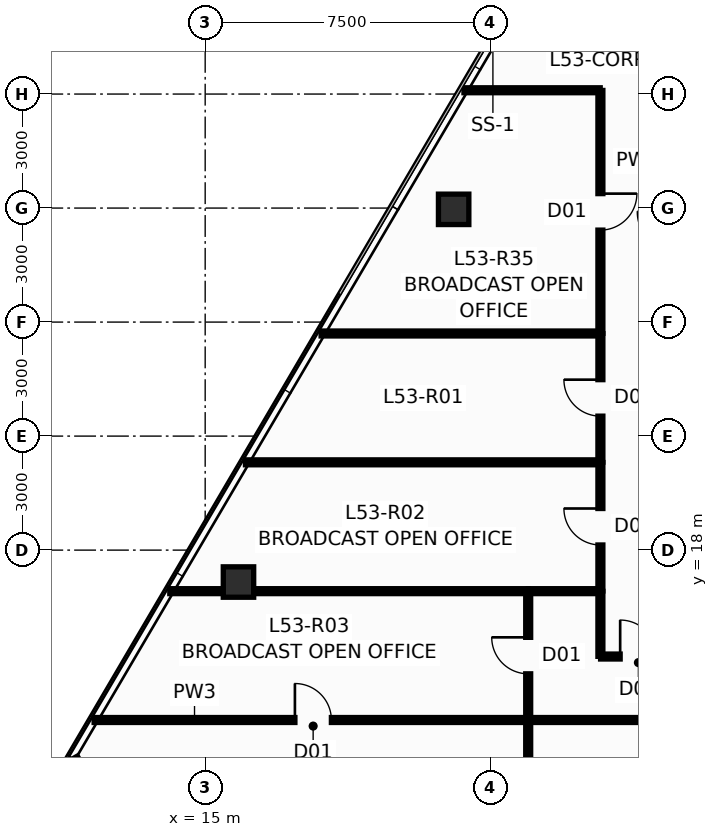
"""IFC4 building model, lengths in metres.
Left out: names, types, materials, properties, quantities, classifications, styles, units other than length and angle.
Written with IfcOpenShell. Run it as: python <this file> out.ifc"""

import sys

from ifc_helpers import new_model, si_unit, direction, frame, frame_2d, origin, origin_2d, place, context, subcontext, project, spatial, rectangle, hollow_rectangle, extrude, source, transform, mapped, element, fill, save


model = new_model("IFC4")
c1 = context("Model", 3, precision=1e-05, world=origin(), true_north=direction((0.0, 1.0)))
c2 = subcontext(c1, "Body", "Model", "MODEL_VIEW")
j1 = project(units=[si_unit("LENGTHUNIT", "METRE"), si_unit("PLANEANGLEUNIT", "RADIAN")], contexts=[c1])
p1 = place(None, origin())
s1 = spatial("IfcSite", under=j1, at=p1, CompositionType="ELEMENT")
p2 = place(p1, origin())
s2 = spatial("IfcBuilding", under=s1, at=p2, CompositionType="ELEMENT")
p3 = place(p2, frame((0.0, 0.0, 202.3)))
s3 = spatial("IfcBuildingStorey", under=s2, at=p3, CompositionType="ELEMENT", Elevation=202.3)
m1 = source(origin(), c2, "Body", "SweptSolid", [
    extrude(hollow_rectangle(XDim=0.8, YDim=0.8, WallThickness=0.045, at=origin_2d()), origin(), (0.0, 0.0, 1.0), 3.651),
])
p4 = place(p3, frame((21.538, 26.967, 0.0), z_axis=(0.014913313399, -0.013776424037, 0.999793880369), x_axis=(0.678553674548, 0.734550822447, 0.0)))
e1 = element("IfcColumn", 1, at=p4, inside=s3, PredefinedType="COLUMN", context=c2, shape_type="MappedRepresentation", body=[
    mapped(m1, transform((0.0, 0.0, 0.0), scale=1.0)),
])
m2 = source(origin(), c2, "Body", "SweptSolid", [
    extrude(hollow_rectangle(XDim=0.8, YDim=0.8, WallThickness=0.045, at=origin_2d()), origin(), (0.0, 0.0, 1.0), 3.651),
])
p5 = place(p3, frame((15.876, 17.16, 0.0), z_axis=(0.010431795422, -0.021532295679, 0.999713727968), x_axis=(0.899947055326, 0.435999194506, 0.0)))
e2 = element("IfcColumn", 2, at=p5, inside=s3, PredefinedType="COLUMN", context=c2, shape_type="MappedRepresentation", body=[
    mapped(m2, transform((0.0, 0.0, 0.0), scale=1.0)),
])
p6 = place(p3, frame((14.689, 6.879, 0.0), z_axis=(0.0, 0.0, 1.0), x_axis=(-0.490928119332, 0.871200081295, 0.0)))
e3 = element("IfcWall", 3, at=p6, inside=s3, PredefinedType="STANDARD", context=c2, shape_type="SweptSolid", body=[
    extrude(rectangle(XDim=6.464, YDim=0.28, at=frame_2d((3.232, 0.0))), origin(), (0.0, 0.0, 1.0), 3.4),
])
p7 = place(p6, frame((1.58, 0.0, 0.9)))
e4 = element("IfcOpeningElement", 4, at=p7, cuts=e3, PredefinedType="OPENING", context=c2, shape_type="SweptSolid", body=[
    extrude(rectangle(XDim=1.5, YDim=1.8, at=frame_2d((0.75, 0.9))), frame((0.0, 0.152, 0.0), z_axis=(0.0, -1.0, 0.0), x_axis=(1.0, 0.0, 0.0)), (0.0, 0.0, 1.0), 0.304),
])
p8 = place(p3, frame((12.078, 13.53, 0.0), z_axis=(0.0, 0.0, 1.0), x_axis=(1.0, 0.0, 0.0)))
e5 = element("IfcWall", 5, at=p8, inside=s3, PredefinedType="PARTITIONING", context=c2, shape_type="SweptSolid", body=[
    extrude(rectangle(XDim=11.417, YDim=0.13, at=frame_2d((5.708, 0.0))), origin(), (0.0, 0.0, 1.0), 3.4),
])
p9 = place(p8, frame((5.283, 0.0, 0.0)))
e6 = element("IfcOpeningElement", 6, at=p9, cuts=e5, PredefinedType="OPENING", context=c2, shape_type="SweptSolid", body=[
    extrude(rectangle(XDim=0.96, YDim=2.15, at=frame_2d((0.48, 1.075))), frame((0.0, 0.077, 0.0), z_axis=(0.0, -1.0, 0.0), x_axis=(1.0, 0.0, 0.0)), (0.0, 0.0, 1.0), 0.154),
])
p10 = place(p3, frame((23.505, 13.53, 0.0), z_axis=(0.0, 0.0, 1.0), x_axis=(1.0, 0.0, 0.0)))
e7 = element("IfcWall", 7, at=p10, inside=s3, PredefinedType="PARTITIONING", context=c2, shape_type="SweptSolid", body=[
    extrude(rectangle(XDim=9.69, YDim=0.13, at=frame_2d((4.845, 0.0))), origin(), (0.0, 0.0, 1.0), 3.078),
])
p11 = place(p10, frame((4.365, 0.0, 0.0)))
e8 = element("IfcOpeningElement", 8, at=p11, cuts=e7, PredefinedType="OPENING", context=c2, shape_type="SweptSolid", body=[
    extrude(rectangle(XDim=0.96, YDim=2.15, at=frame_2d((0.48, 1.075))), frame((0.0, 0.077, 0.0), z_axis=(0.0, -1.0, 0.0), x_axis=(1.0, 0.0, 0.0)), (0.0, 0.0, 1.0), 0.154),
])
p12 = place(p3, frame((14.069, 16.92, 0.0), z_axis=(0.0, 0.0, 1.0), x_axis=(1.0, 0.0, 0.0)))
e9 = element("IfcWall", 9, at=p12, inside=s3, PredefinedType="PARTITIONING", context=c2, shape_type="SweptSolid", body=[
    extrude(rectangle(XDim=9.426, YDim=0.13, at=frame_2d((4.713, 0.0))), origin(), (0.0, 0.0, 1.0), 2.925),
])
p13 = place(p3, frame((16.06, 20.31, 0.0), z_axis=(0.0, 0.0, 1.0), x_axis=(1.0, 0.0, 0.0)))
e10 = element("IfcWall", 10, at=p13, inside=s3, PredefinedType="PARTITIONING", context=c2, shape_type="SweptSolid", body=[
    extrude(rectangle(XDim=9.335, YDim=0.13, at=frame_2d((4.667, 0.0))), origin(), (0.0, 0.0, 1.0), 3.4),
])
p14 = place(p3, frame((18.051, 23.7, 0.0), z_axis=(0.0, 0.0, 1.0), x_axis=(1.0, 0.0, 0.0)))
e11 = element("IfcWall", 11, at=p14, inside=s3, PredefinedType="PARTITIONING", context=c2, shape_type="SweptSolid", body=[
    extrude(rectangle(XDim=7.344, YDim=0.13, at=frame_2d((3.672, 0.0))), origin(), (0.0, 0.0, 1.0), 3.4),
])
p15 = place(p3, frame((25.4, 30.095, 0.0), z_axis=(0.0, 0.0, 1.0), x_axis=(0.0, -1.0, 0.0)))
e12 = element("IfcWall", 12, at=p15, inside=s3, PredefinedType="PARTITIONING", context=c2, shape_type="SweptSolid", body=[
    extrude(rectangle(XDim=6.39, YDim=0.13, at=frame_2d((3.195, 0.0))), origin(), (0.0, 0.0, 1.0), 3.078),
])
p16 = place(p15, frame((2.715, 0.0, 0.0)))
e13 = element("IfcOpeningElement", 13, at=p16, cuts=e12, PredefinedType="OPENING", context=c2, shape_type="SweptSolid", body=[
    extrude(rectangle(XDim=0.96, YDim=2.15, at=frame_2d((0.48, 1.075))), frame((0.0, 0.077, 0.0), z_axis=(0.0, -1.0, 0.0), x_axis=(1.0, 0.0, 0.0)), (0.0, 0.0, 1.0), 0.154),
])
p17 = place(p3, frame((21.81, 30.1, 0.0), z_axis=(0.0, 0.0, 1.0), x_axis=(1.0, 0.0, 0.0)))
e14 = element("IfcWall", 14, at=p17, inside=s3, PredefinedType="PARTITIONING", context=c2, shape_type="SweptSolid", body=[
    extrude(rectangle(XDim=3.585, YDim=0.13, at=frame_2d((1.793, 0.0))), origin(), (0.0, 0.0, 1.0), 3.4),
])
p18 = place(p3, frame((23.5, 13.535, 0.0), z_axis=(0.0, 0.0, 1.0), x_axis=(0.0, 1.0, 0.0)))
e15 = element("IfcWall", 15, at=p18, inside=s3, PredefinedType="PARTITIONING", context=c2, shape_type="SweptSolid", body=[
    extrude(rectangle(XDim=3.38, YDim=0.13, at=frame_2d((1.69, 0.0))), origin(), (0.0, 0.0, 1.0), 3.4),
])
p19 = place(p18, frame((1.21, 0.0, 0.0)))
e16 = element("IfcOpeningElement", 16, at=p19, cuts=e15, PredefinedType="OPENING", context=c2, shape_type="SweptSolid", body=[
    extrude(rectangle(XDim=0.96, YDim=2.15, at=frame_2d((0.48, 1.075))), frame((0.0, 0.077, 0.0), z_axis=(0.0, -1.0, 0.0), x_axis=(1.0, 0.0, 0.0)), (0.0, 0.0, 1.0), 0.154),
])
p20 = place(p3, frame((25.4, 20.315, 0.0), z_axis=(0.0, 0.0, 1.0), x_axis=(0.0, 1.0, 0.0)))
e17 = element("IfcWall", 17, at=p20, inside=s3, PredefinedType="PARTITIONING", context=c2, shape_type="SweptSolid", body=[
    extrude(rectangle(XDim=3.38, YDim=0.13, at=frame_2d((1.69, 0.0))), origin(), (0.0, 0.0, 1.0), 3.078),
])
p21 = place(p20, frame((1.21, 0.0, 0.0)))
e18 = element("IfcOpeningElement", 18, at=p21, cuts=e17, PredefinedType="OPENING", context=c2, shape_type="SweptSolid", body=[
    extrude(rectangle(XDim=0.96, YDim=2.15, at=frame_2d((0.48, 1.075))), frame((0.0, 0.077, 0.0), z_axis=(0.0, -1.0, 0.0), x_axis=(1.0, 0.0, 0.0)), (0.0, 0.0, 1.0), 0.154),
])
p22 = place(p3, frame((23.5, 10.145, 0.0), z_axis=(0.0, 0.0, 1.0), x_axis=(0.0, 1.0, 0.0)))
e19 = element("IfcWall", 19, at=p22, inside=s3, PredefinedType="PARTITIONING", context=c2, shape_type="SweptSolid", body=[
    extrude(rectangle(XDim=3.38, YDim=0.13, at=frame_2d((1.69, 0.0))), origin(), (0.0, 0.0, 1.0), 3.4),
])
p23 = place(p3, frame((25.4, 16.925, 0.0), z_axis=(0.0, 0.0, 1.0), x_axis=(0.0, 1.0, 0.0)))
e20 = element("IfcWall", 20, at=p23, inside=s3, PredefinedType="PARTITIONING", context=c2, shape_type="SweptSolid", body=[
    extrude(rectangle(XDim=3.38, YDim=0.13, at=frame_2d((1.69, 0.0))), origin(), (0.0, 0.0, 1.0), 3.078),
])
p24 = place(p23, frame((1.21, 0.0, 0.0)))
e21 = element("IfcOpeningElement", 21, at=p24, cuts=e20, PredefinedType="OPENING", context=c2, shape_type="SweptSolid", body=[
    extrude(rectangle(XDim=0.96, YDim=2.15, at=frame_2d((0.48, 1.075))), frame((0.0, 0.077, 0.0), z_axis=(0.0, -1.0, 0.0), x_axis=(1.0, 0.0, 0.0)), (0.0, 0.0, 1.0), 0.154),
])
p25 = place(p3, frame((25.405, 15.2, 0.0), z_axis=(0.0, 0.0, 1.0), x_axis=(1.0, 0.0, 0.0)))
e22 = element("IfcWall", 22, at=p25, inside=s3, PredefinedType="PARTITIONING", context=c2, shape_type="SweptSolid", body=[
    extrude(rectangle(XDim=1.99, YDim=0.13, at=frame_2d((0.995, 0.0))), origin(), (0.0, 0.0, 1.0), 3.4),
])
p26 = place(p25, frame((0.515, 0.0, 0.0)))
e23 = element("IfcOpeningElement", 23, at=p26, cuts=e22, PredefinedType="OPENING", context=c2, shape_type="SweptSolid", body=[
    extrude(rectangle(XDim=0.96, YDim=2.15, at=frame_2d((0.48, 1.075))), frame((0.0, 0.077, 0.0), z_axis=(0.0, -1.0, 0.0), x_axis=(1.0, 0.0, 0.0)), (0.0, 0.0, 1.0), 0.154),
])
p27 = place(p3, frame((23.505, 16.92, 0.0), z_axis=(0.0, 0.0, 1.0), x_axis=(1.0, 0.0, 0.0)))
e24 = element("IfcWall", 24, at=p27, inside=s3, PredefinedType="PARTITIONING", context=c2, shape_type="SweptSolid", body=[
    extrude(rectangle(XDim=1.89, YDim=0.13, at=frame_2d((0.945, 0.0))), origin(), (0.0, 0.0, 1.0), 2.925),
])
p28 = place(p3, frame((25.4, 16.915, 0.0), z_axis=(0.0, 0.0, 1.0), x_axis=(0.0, -1.0, 0.0)))
e25 = element("IfcWall", 25, at=p28, inside=s3, PredefinedType="PARTITIONING", context=c2, shape_type="SweptSolid", body=[
    extrude(rectangle(XDim=1.71, YDim=0.13, at=frame_2d((0.855, 0.0))), origin(), (0.0, 0.0, 1.0), 3.4),
])
p29 = place(p9, origin())
e26 = element("IfcDoor", 26, at=p29, inside=s3, OperationType="SINGLE_SWING_LEFT", PredefinedType="DOOR", context=c2, shape_type="SweptSolid", body=[
    extrude(rectangle(XDim=0.96, YDim=2.15, at=frame_2d((0.48, 1.075))), frame((0.0, 0.025, 0.0), z_axis=(0.0, -1.0, 0.0), x_axis=(1.0, 0.0, 0.0)), (0.0, 0.0, 1.0), 0.05),
])
fill(e6, e26)
p30 = place(p16, origin())
e27 = element("IfcDoor", 27, at=p30, inside=s3, OperationType="SINGLE_SWING_LEFT", PredefinedType="DOOR", context=c2, shape_type="SweptSolid", body=[
    extrude(rectangle(XDim=0.96, YDim=2.15, at=frame_2d((0.48, 1.075))), frame((0.0, 0.025, 0.0), z_axis=(0.0, -1.0, 0.0), x_axis=(1.0, 0.0, 0.0)), (0.0, 0.0, 1.0), 0.05),
])
fill(e13, e27)
p31 = place(p19, origin())
e28 = element("IfcDoor", 28, at=p31, inside=s3, OperationType="SINGLE_SWING_RIGHT", PredefinedType="DOOR", context=c2, shape_type="SweptSolid", body=[
    extrude(rectangle(XDim=0.96, YDim=2.15, at=frame_2d((0.48, 1.075))), frame((0.0, 0.025, 0.0), z_axis=(0.0, -1.0, 0.0), x_axis=(1.0, 0.0, 0.0)), (0.0, 0.0, 1.0), 0.05),
])
fill(e16, e28)
p32 = place(p21, origin())
e29 = element("IfcDoor", 29, at=p32, inside=s3, OperationType="SINGLE_SWING_RIGHT", PredefinedType="DOOR", context=c2, shape_type="SweptSolid", body=[
    extrude(rectangle(XDim=0.96, YDim=2.15, at=frame_2d((0.48, 1.075))), frame((0.0, 0.025, 0.0), z_axis=(0.0, -1.0, 0.0), x_axis=(1.0, 0.0, 0.0)), (0.0, 0.0, 1.0), 0.05),
])
fill(e18, e29)
p33 = place(p24, origin())
e30 = element("IfcDoor", 30, at=p33, inside=s3, OperationType="SINGLE_SWING_RIGHT", PredefinedType="DOOR", context=c2, shape_type="SweptSolid", body=[
    extrude(rectangle(XDim=0.96, YDim=2.15, at=frame_2d((0.48, 1.075))), frame((0.0, 0.025, 0.0), z_axis=(0.0, -1.0, 0.0), x_axis=(1.0, 0.0, 0.0)), (0.0, 0.0, 1.0), 0.05),
])
fill(e21, e30)
p34 = place(p26, origin())
e31 = element("IfcDoor", 31, at=p34, inside=s3, OperationType="SINGLE_SWING_LEFT", PredefinedType="DOOR", context=c2, shape_type="SweptSolid", body=[
    extrude(rectangle(XDim=0.96, YDim=2.15, at=frame_2d((0.48, 1.075))), frame((0.0, 0.025, 0.0), z_axis=(0.0, -1.0, 0.0), x_axis=(1.0, 0.0, 0.0)), (0.0, 0.0, 1.0), 0.05),
])
fill(e23, e31)
save(model, sys.argv[1])
